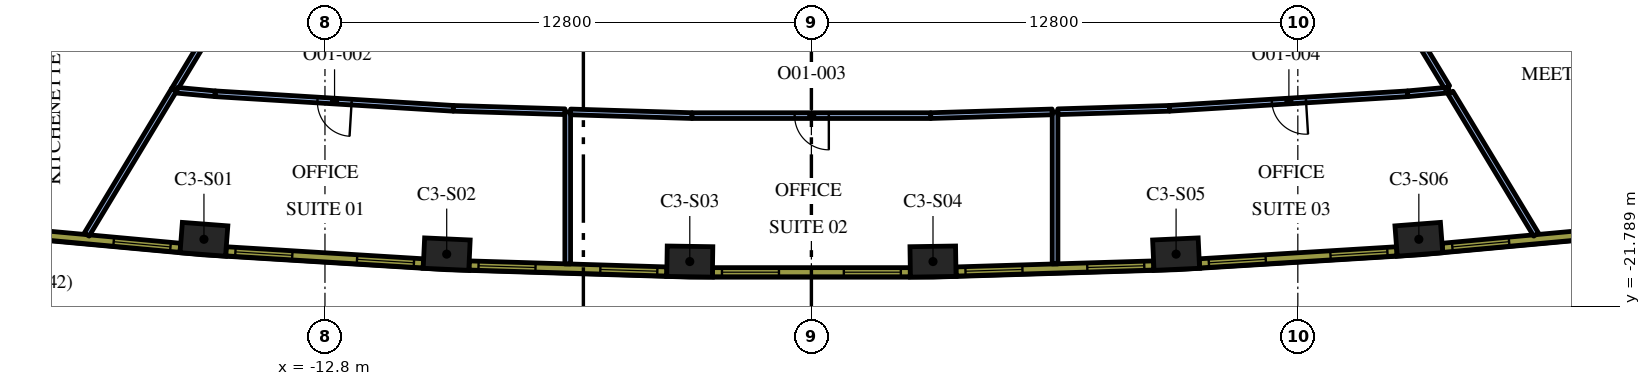
"""IFC4 building model, lengths in metres.
Left out: names, types, materials, properties, quantities, classifications, styles, units other than length and angle.
Written with IfcOpenShell. Run it as: python <this file> out.ifc"""

import sys

from ifc_helpers import new_model, si_unit, direction, frame, frame_2d, origin, origin_2d, place, context, subcontext, project, spatial, rectangle, extrude, element, fill, save


model = new_model("IFC4")
c1 = context("Model", 3, precision=1e-05, world=origin(), true_north=direction((0.0, 1.0)))
c2 = subcontext(c1, "Body", "Model", "MODEL_VIEW")
j1 = project(units=[si_unit("LENGTHUNIT", "METRE"), si_unit("PLANEANGLEUNIT", "RADIAN")], contexts=[c1])
p1 = place(None, origin())
s1 = spatial("IfcSite", under=j1, at=p1, CompositionType="ELEMENT")
p2 = place(p1, origin())
s2 = spatial("IfcBuilding", under=s1, at=p2, CompositionType="ELEMENT")
p3 = place(p2, frame((0.0, 0.0, 145.8)))
s3 = spatial("IfcBuildingStorey", under=s2, at=p3, CompositionType="ELEMENT", Elevation=145.8)
for number, where, z_axis, x_axis in (
    (1, (-15.985, -20.022, 0.0), (0.0, 0.0, 1.0), (0.997, -0.076, 0.0)),
    (2, (-9.597, -20.413, 0.0), (0.0, 0.0, 1.0), (0.999, -0.046, 0.0)),
    (3, (-3.2, -20.608, 0.0), (0.0, 0.0, 1.0), (1.0, -0.015, 0.0)),
    (4, (3.2, -20.608, 0.0), (0.0, 0.0, 1.0), (1.0, 0.015, 0.0)),
    (5, (9.597, -20.413, 0.0), (0.0, 0.0, 1.0), (0.999, 0.046, 0.0)),
    (6, (15.985, -20.022, 0.0), (0.0, 0.0, 1.0), (0.997, 0.076, 0.0)),
):
    element("IfcColumn", number, at=place(p3, frame(where, z_axis=z_axis, x_axis=x_axis)), inside=s3, PredefinedType="COLUMN", context=c2, shape_type="SweptSolid", body=[
        extrude(rectangle(XDim=1.2, YDim=0.8, at=origin_2d()), origin(), (0.0, 0.0, 1.0), 4.2),
    ])
p4 = place(p3, frame((-16.771, -16.09, 0.0), z_axis=(0.0, 0.0, 1.0), x_axis=(-0.516817512045, -0.856095590015, 0.0)))
e7 = element("IfcWall", 7, at=p4, inside=s3, PredefinedType="PARTITIONING", context=c2, shape_type="SweptSolid", body=[
    extrude(rectangle(XDim=4.45, YDim=0.15, at=frame_2d((2.225, 0.0))), origin(), (0.0, 0.0, 1.0), 3.15),
])
p5 = place(p3, frame((-16.775, -16.097, 0.0), z_axis=(0.0, 0.0, 1.0), x_axis=(0.516793803756, 0.856109902057, 0.0)))
e8 = element("IfcWall", 8, at=p5, inside=s3, PredefinedType="PARTITIONING", context=c2, shape_type="SweptSolid", body=[
    extrude(rectangle(XDim=3.856, YDim=0.15, at=frame_2d((1.928, 0.0))), origin(), (0.0, 0.0, 1.0), 3.15),
])
p6 = place(p5, frame((1.456, 0.0, 0.0)))
e9 = element("IfcOpeningElement", 9, at=p6, cuts=e8, PredefinedType="OPENING", context=c2, shape_type="SweptSolid", body=[
    extrude(rectangle(XDim=0.9, YDim=2.1, at=frame_2d((0.45, 1.05))), frame((0.0, 0.085, 0.0), z_axis=(0.0, -1.0, 0.0), x_axis=(1.0, 0.0, 0.0)), (0.0, 0.0, 1.0), 0.17),
])
p7 = place(p3, frame((-6.412, -16.668, 0.0), z_axis=(0.0, 0.0, 1.0), x_axis=(0.0, -1.0, 0.0)))
e10 = element("IfcWall", 10, at=p7, inside=s3, PredefinedType="PARTITIONING", context=c2, shape_type="SweptSolid", body=[
    extrude(rectangle(XDim=4.002, YDim=0.15, at=frame_2d((2.001, 0.0))), origin(), (0.0, 0.0, 1.0), 3.15),
])
p8 = place(p3, frame((-16.69, -16.102, 0.0), z_axis=(0.0, 0.0, 1.0), x_axis=(0.995818997537, -0.091348366946, 0.0)))
e11 = element("IfcWall", 11, at=p8, inside=s3, PredefinedType="PARTITIONING", context=c2, shape_type="SweptSolid", body=[
    extrude(rectangle(XDim=1.002, YDim=0.15, at=frame_2d((0.501, 0.0))), origin(), (0.0, 0.0, 1.0), 3.15),
])
p9 = place(p3, frame((-9.421, -16.576, 0.0), z_axis=(0.0, 0.0, 1.0), x_axis=(-0.998137075468, 0.061011298754, 0.0)))
e12 = element("IfcWall", 12, at=p9, inside=s3, PredefinedType="PARTITIONING", context=c2, shape_type="SweptSolid", body=[
    extrude(rectangle(XDim=6.282, YDim=0.15, at=frame_2d((3.141, 0.0))), origin(), (0.0, 0.0, 1.0), 3.15),
])
p10 = place(p9, frame((2.683, 0.0, 0.0)))
e13 = element("IfcOpeningElement", 13, at=p10, cuts=e12, PredefinedType="OPENING", context=c2, shape_type="SweptSolid", body=[
    extrude(rectangle(XDim=0.9, YDim=2.1, at=frame_2d((0.45, 1.05))), frame((0.0, 0.085, 0.0), z_axis=(0.0, -1.0, 0.0), x_axis=(1.0, 0.0, 0.0)), (0.0, 0.0, 1.0), 0.17),
])
p11 = place(p3, frame((-9.421, -16.576, 0.0), z_axis=(0.0, 0.0, 1.0), x_axis=(0.999533978083, -0.030525835896, 0.0)))
e14 = element("IfcWall", 14, at=p11, inside=s3, PredefinedType="PARTITIONING", context=c2, shape_type="SweptSolid", body=[
    extrude(rectangle(XDim=2.935, YDim=0.15, at=frame_2d((1.468, 0.0))), origin(), (0.0, 0.0, 1.0), 3.15),
])
p12 = place(p3, frame((6.412, -16.668, 0.0), z_axis=(0.0, 0.0, 1.0), x_axis=(0.0, -1.0, 0.0)))
e15 = element("IfcWall", 15, at=p12, inside=s3, PredefinedType="PARTITIONING", context=c2, shape_type="SweptSolid", body=[
    extrude(rectangle(XDim=4.002, YDim=0.15, at=frame_2d((2.001, 0.0))), origin(), (0.0, 0.0, 1.0), 3.15),
])
p13 = place(p3, frame((-6.337, -16.671, 0.0), z_axis=(0.0, 0.0, 1.0), x_axis=(0.999533369646, -0.030545751995, 0.0)))
e16 = element("IfcWall", 16, at=p13, inside=s3, PredefinedType="PARTITIONING", context=c2, shape_type="SweptSolid", body=[
    extrude(rectangle(XDim=3.197, YDim=0.15, at=frame_2d((1.599, 0.0))), origin(), (0.0, 0.0, 1.0), 3.15),
])
p14 = place(p3, frame((3.141, -16.768, 0.0), z_axis=(0.0, 0.0, 1.0), x_axis=(-1.0, 0.0, 0.0)))
e17 = element("IfcWall", 17, at=p14, inside=s3, PredefinedType="PARTITIONING", context=c2, shape_type="SweptSolid", body=[
    extrude(rectangle(XDim=6.283, YDim=0.15, at=frame_2d((3.141, 0.0))), origin(), (0.0, 0.0, 1.0), 3.15),
])
p15 = place(p14, frame((2.683, 0.0, 0.0)))
e18 = element("IfcOpeningElement", 18, at=p15, cuts=e17, PredefinedType="OPENING", context=c2, shape_type="SweptSolid", body=[
    extrude(rectangle(XDim=0.9, YDim=2.1, at=frame_2d((0.45, 1.05))), frame((0.0, 0.085, 0.0), z_axis=(0.0, -1.0, 0.0), x_axis=(1.0, 0.0, 0.0)), (0.0, 0.0, 1.0), 0.17),
])
p16 = place(p3, frame((3.141, -16.768, 0.0), z_axis=(0.0, 0.0, 1.0), x_axis=(0.999533369646, 0.030545751995, 0.0)))
e19 = element("IfcWall", 19, at=p16, inside=s3, PredefinedType="PARTITIONING", context=c2, shape_type="SweptSolid", body=[
    extrude(rectangle(XDim=3.197, YDim=0.15, at=frame_2d((1.599, 0.0))), origin(), (0.0, 0.0, 1.0), 3.15),
])
p17 = place(p3, frame((6.487, -16.666, 0.0), z_axis=(0.0, 0.0, 1.0), x_axis=(0.999533978083, 0.030525835896, 0.0)))
e20 = element("IfcWall", 20, at=p17, inside=s3, PredefinedType="PARTITIONING", context=c2, shape_type="SweptSolid", body=[
    extrude(rectangle(XDim=2.935, YDim=0.15, at=frame_2d((1.468, 0.0))), origin(), (0.0, 0.0, 1.0), 3.15),
])
p18 = place(p3, frame((15.692, -16.193, 0.0), z_axis=(0.0, 0.0, 1.0), x_axis=(-0.998137075468, -0.061011298754, 0.0)))
e21 = element("IfcWall", 21, at=p18, inside=s3, PredefinedType="PARTITIONING", context=c2, shape_type="SweptSolid", body=[
    extrude(rectangle(XDim=6.282, YDim=0.15, at=frame_2d((3.141, 0.0))), origin(), (0.0, 0.0, 1.0), 3.15),
])
p19 = place(p18, frame((2.683, 0.0, 0.0)))
e22 = element("IfcOpeningElement", 22, at=p19, cuts=e21, PredefinedType="OPENING", context=c2, shape_type="SweptSolid", body=[
    extrude(rectangle(XDim=0.9, YDim=2.1, at=frame_2d((0.45, 1.05))), frame((0.0, 0.085, 0.0), z_axis=(0.0, -1.0, 0.0), x_axis=(1.0, 0.0, 0.0)), (0.0, 0.0, 1.0), 0.17),
])
p20 = place(p3, frame((15.692, -16.193, 0.0), z_axis=(0.0, 0.0, 1.0), x_axis=(0.995822859979, 0.091306251389, 0.0)))
e23 = element("IfcWall", 23, at=p20, inside=s3, PredefinedType="PARTITIONING", context=c2, shape_type="SweptSolid", body=[
    extrude(rectangle(XDim=1.086, YDim=0.15, at=frame_2d((0.543, 0.0))), origin(), (0.0, 0.0, 1.0), 3.15),
])
p21 = place(p3, frame((16.816, -16.165, 0.0), z_axis=(0.0, 0.0, 1.0), x_axis=(0.516814925326, -0.85609715159, 0.0)))
e24 = element("IfcWall", 24, at=p21, inside=s3, PredefinedType="PARTITIONING", context=c2, shape_type="SweptSolid", body=[
    extrude(rectangle(XDim=4.362, YDim=0.15, at=frame_2d((2.181, 0.0))), origin(), (0.0, 0.0, 1.0), 3.15),
])
p22 = place(p3, frame((14.782, -12.796, 0.0), z_axis=(0.0, 0.0, 1.0), x_axis=(0.516809076879, -0.856100682196, 0.0)))
e25 = element("IfcWall", 25, at=p22, inside=s3, PredefinedType="PARTITIONING", context=c2, shape_type="SweptSolid", body=[
    extrude(rectangle(XDim=3.768, YDim=0.15, at=frame_2d((1.884, 0.0))), origin(), (0.0, 0.0, 1.0), 3.15),
])
p23 = place(p22, frame((1.4, 0.0, 0.0)))
e26 = element("IfcOpeningElement", 26, at=p23, cuts=e25, PredefinedType="OPENING", context=c2, shape_type="SweptSolid", body=[
    extrude(rectangle(XDim=0.9, YDim=2.1, at=frame_2d((0.45, 1.05))), frame((0.0, 0.085, 0.0), z_axis=(0.0, -1.0, 0.0), x_axis=(1.0, 0.0, 0.0)), (0.0, 0.0, 1.0), 0.17),
])
p24 = place(p3, frame((-21.797, -19.77, 0.0), z_axis=(0.0, 0.0, 1.0), x_axis=(0.995808712151, -0.091460422067, 0.0)))
e27 = element("IfcWall", 27, at=p24, inside=s3, PredefinedType="SOLIDWALL", context=c2, shape_type="SweptSolid", body=[
    extrude(rectangle(XDim=5.213, YDim=0.24, at=frame_2d((2.606, 0.0))), origin(), (0.0, 0.0, 1.0), 3.95),
])
p25 = place(p24, frame((0.221, 0.0, 0.9)))
e28 = element("IfcOpeningElement", 28, at=p25, cuts=e27, PredefinedType="OPENING", context=c2, shape_type="SweptSolid", body=[
    extrude(rectangle(XDim=1.5, YDim=2.55, at=frame_2d((0.75, 1.275))), frame((0.0, 0.13, 0.0), z_axis=(0.0, -1.0, 0.0), x_axis=(1.0, 0.0, 0.0)), (0.0, 0.0, 1.0), 0.26),
])
p26 = place(p24, frame((3.452, 0.0, 0.9)))
e29 = element("IfcOpeningElement", 29, at=p26, cuts=e27, PredefinedType="OPENING", context=c2, shape_type="SweptSolid", body=[
    extrude(rectangle(XDim=1.5, YDim=2.55, at=frame_2d((0.75, 1.275))), frame((0.0, 0.13, 0.0), z_axis=(0.0, -1.0, 0.0), x_axis=(1.0, 0.0, 0.0)), (0.0, 0.0, 1.0), 0.26),
])
p27 = place(p3, frame((-15.405, -20.338, 0.0), z_axis=(0.0, 0.0, 1.0), x_axis=(0.998135294646, -0.061040425794, 0.0)))
e30 = element("IfcWall", 30, at=p27, inside=s3, PredefinedType="SOLIDWALL", context=c2, shape_type="SweptSolid", body=[
    extrude(rectangle(XDim=5.204, YDim=0.24, at=frame_2d((2.602, 0.0))), origin(), (0.0, 0.0, 1.0), 3.95),
])
p28 = place(p27, frame((0.248, 0.0, 0.9)))
e31 = element("IfcOpeningElement", 31, at=p28, cuts=e30, PredefinedType="OPENING", context=c2, shape_type="SweptSolid", body=[
    extrude(rectangle(XDim=1.5, YDim=2.55, at=frame_2d((0.75, 1.275))), frame((0.0, 0.13, 0.0), z_axis=(0.0, -1.0, 0.0), x_axis=(1.0, 0.0, 0.0)), (0.0, 0.0, 1.0), 0.26),
])
p29 = place(p27, frame((3.455, 0.0, 0.9)))
e32 = element("IfcOpeningElement", 32, at=p29, cuts=e30, PredefinedType="OPENING", context=c2, shape_type="SweptSolid", body=[
    extrude(rectangle(XDim=1.5, YDim=2.55, at=frame_2d((0.75, 1.275))), frame((0.0, 0.13, 0.0), z_axis=(0.0, -1.0, 0.0), x_axis=(1.0, 0.0, 0.0)), (0.0, 0.0, 1.0), 0.26),
])
p30 = place(p3, frame((-9.007, -20.711, 0.0), z_axis=(0.0, 0.0, 1.0), x_axis=(0.999533441983, -0.030543384845, 0.0)))
e33 = element("IfcWall", 33, at=p30, inside=s3, PredefinedType="SOLIDWALL", context=c2, shape_type="SweptSolid", body=[
    extrude(rectangle(XDim=5.204, YDim=0.24, at=frame_2d((2.602, 0.0))), origin(), (0.0, 0.0, 1.0), 3.95),
])
p31 = place(p30, frame((0.248, 0.0, 0.9)))
e34 = element("IfcOpeningElement", 34, at=p31, cuts=e33, PredefinedType="OPENING", context=c2, shape_type="SweptSolid", body=[
    extrude(rectangle(XDim=1.5, YDim=2.55, at=frame_2d((0.75, 1.275))), frame((0.0, 0.13, 0.0), z_axis=(0.0, -1.0, 0.0), x_axis=(1.0, 0.0, 0.0)), (0.0, 0.0, 1.0), 0.26),
])
p32 = place(p30, frame((3.455, 0.0, 0.9)))
e35 = element("IfcOpeningElement", 35, at=p32, cuts=e33, PredefinedType="OPENING", context=c2, shape_type="SweptSolid", body=[
    extrude(rectangle(XDim=1.5, YDim=2.55, at=frame_2d((0.75, 1.275))), frame((0.0, 0.13, 0.0), z_axis=(0.0, -1.0, 0.0), x_axis=(1.0, 0.0, 0.0)), (0.0, 0.0, 1.0), 0.26),
])
p33 = place(p3, frame((-2.602, -20.888, 0.0), z_axis=(0.0, 0.0, 1.0), x_axis=(1.0, 0.0, 0.0)))
e36 = element("IfcWall", 36, at=p33, inside=s3, PredefinedType="SOLIDWALL", context=c2, shape_type="SweptSolid", body=[
    extrude(rectangle(XDim=5.204, YDim=0.24, at=frame_2d((2.602, 0.0))), origin(), (0.0, 0.0, 1.0), 3.95),
])
p34 = place(p33, frame((0.248, 0.0, 0.9)))
e37 = element("IfcOpeningElement", 37, at=p34, cuts=e36, PredefinedType="OPENING", context=c2, shape_type="SweptSolid", body=[
    extrude(rectangle(XDim=1.5, YDim=2.55, at=frame_2d((0.75, 1.275))), frame((0.0, 0.13, 0.0), z_axis=(0.0, -1.0, 0.0), x_axis=(1.0, 0.0, 0.0)), (0.0, 0.0, 1.0), 0.26),
])
p35 = place(p33, frame((3.455, 0.0, 0.9)))
e38 = element("IfcOpeningElement", 38, at=p35, cuts=e36, PredefinedType="OPENING", context=c2, shape_type="SweptSolid", body=[
    extrude(rectangle(XDim=1.5, YDim=2.55, at=frame_2d((0.75, 1.275))), frame((0.0, 0.13, 0.0), z_axis=(0.0, -1.0, 0.0), x_axis=(1.0, 0.0, 0.0)), (0.0, 0.0, 1.0), 0.26),
])
p36 = place(p3, frame((3.806, -20.87, 0.0), z_axis=(0.0, 0.0, 1.0), x_axis=(0.999533441983, 0.030543384845, 0.0)))
e39 = element("IfcWall", 39, at=p36, inside=s3, PredefinedType="SOLIDWALL", context=c2, shape_type="SweptSolid", body=[
    extrude(rectangle(XDim=5.204, YDim=0.24, at=frame_2d((2.602, 0.0))), origin(), (0.0, 0.0, 1.0), 3.95),
])
p37 = place(p36, frame((0.248, 0.0, 0.9)))
e40 = element("IfcOpeningElement", 40, at=p37, cuts=e39, PredefinedType="OPENING", context=c2, shape_type="SweptSolid", body=[
    extrude(rectangle(XDim=1.5, YDim=2.55, at=frame_2d((0.75, 1.275))), frame((0.0, 0.13, 0.0), z_axis=(0.0, -1.0, 0.0), x_axis=(1.0, 0.0, 0.0)), (0.0, 0.0, 1.0), 0.26),
])
p38 = place(p36, frame((3.455, 0.0, 0.9)))
e41 = element("IfcOpeningElement", 41, at=p38, cuts=e39, PredefinedType="OPENING", context=c2, shape_type="SweptSolid", body=[
    extrude(rectangle(XDim=1.5, YDim=2.55, at=frame_2d((0.75, 1.275))), frame((0.0, 0.13, 0.0), z_axis=(0.0, -1.0, 0.0), x_axis=(1.0, 0.0, 0.0)), (0.0, 0.0, 1.0), 0.26),
])
p39 = place(p3, frame((10.211, -20.656, 0.0), z_axis=(0.0, 0.0, 1.0), x_axis=(0.998135294646, 0.061040425794, 0.0)))
e42 = element("IfcWall", 42, at=p39, inside=s3, PredefinedType="SOLIDWALL", context=c2, shape_type="SweptSolid", body=[
    extrude(rectangle(XDim=5.204, YDim=0.24, at=frame_2d((2.602, 0.0))), origin(), (0.0, 0.0, 1.0), 3.95),
])
p40 = place(p39, frame((0.248, 0.0, 0.9)))
e43 = element("IfcOpeningElement", 43, at=p40, cuts=e42, PredefinedType="OPENING", context=c2, shape_type="SweptSolid", body=[
    extrude(rectangle(XDim=1.5, YDim=2.55, at=frame_2d((0.75, 1.275))), frame((0.0, 0.13, 0.0), z_axis=(0.0, -1.0, 0.0), x_axis=(1.0, 0.0, 0.0)), (0.0, 0.0, 1.0), 0.26),
])
p41 = place(p39, frame((3.455, 0.0, 0.9)))
e44 = element("IfcOpeningElement", 44, at=p41, cuts=e42, PredefinedType="OPENING", context=c2, shape_type="SweptSolid", body=[
    extrude(rectangle(XDim=1.5, YDim=2.55, at=frame_2d((0.75, 1.275))), frame((0.0, 0.13, 0.0), z_axis=(0.0, -1.0, 0.0), x_axis=(1.0, 0.0, 0.0)), (0.0, 0.0, 1.0), 0.26),
])
p42 = place(p3, frame((16.606, -20.247, 0.0), z_axis=(0.0, 0.0, 1.0), x_axis=(0.995808712151, 0.091460422067, 0.0)))
e45 = element("IfcWall", 45, at=p42, inside=s3, PredefinedType="SOLIDWALL", context=c2, shape_type="SweptSolid", body=[
    extrude(rectangle(XDim=5.213, YDim=0.24, at=frame_2d((2.606, 0.0))), origin(), (0.0, 0.0, 1.0), 3.95),
])
p43 = place(p42, frame((0.261, 0.0, 0.9)))
e46 = element("IfcOpeningElement", 46, at=p43, cuts=e45, PredefinedType="OPENING", context=c2, shape_type="SweptSolid", body=[
    extrude(rectangle(XDim=1.5, YDim=2.55, at=frame_2d((0.75, 1.275))), frame((0.0, 0.13, 0.0), z_axis=(0.0, -1.0, 0.0), x_axis=(1.0, 0.0, 0.0)), (0.0, 0.0, 1.0), 0.26),
])
p44 = place(p42, frame((3.492, 0.0, 0.9)))
e47 = element("IfcOpeningElement", 47, at=p44, cuts=e45, PredefinedType="OPENING", context=c2, shape_type="SweptSolid", body=[
    extrude(rectangle(XDim=1.5, YDim=2.55, at=frame_2d((0.75, 1.275))), frame((0.0, 0.13, 0.0), z_axis=(0.0, -1.0, 0.0), x_axis=(1.0, 0.0, 0.0)), (0.0, 0.0, 1.0), 0.26),
])
p45 = place(p10, origin())
e48 = element("IfcDoor", 48, at=p45, inside=s3, OperationType="SINGLE_SWING_LEFT", PredefinedType="DOOR", context=c2, shape_type="SweptSolid", body=[
    extrude(rectangle(XDim=0.9, YDim=2.1, at=frame_2d((0.45, 1.05))), frame((0.0, 0.025, 0.0), z_axis=(0.0, -1.0, 0.0), x_axis=(1.0, 0.0, 0.0)), (0.0, 0.0, 1.0), 0.05),
])
fill(e13, e48)
p46 = place(p15, origin())
e49 = element("IfcDoor", 49, at=p46, inside=s3, OperationType="SINGLE_SWING_LEFT", PredefinedType="DOOR", context=c2, shape_type="SweptSolid", body=[
    extrude(rectangle(XDim=0.9, YDim=2.1, at=frame_2d((0.45, 1.05))), frame((0.0, 0.025, 0.0), z_axis=(0.0, -1.0, 0.0), x_axis=(1.0, 0.0, 0.0)), (0.0, 0.0, 1.0), 0.05),
])
fill(e18, e49)
p47 = place(p19, origin())
e50 = element("IfcDoor", 50, at=p47, inside=s3, OperationType="SINGLE_SWING_LEFT", PredefinedType="DOOR", context=c2, shape_type="SweptSolid", body=[
    extrude(rectangle(XDim=0.9, YDim=2.1, at=frame_2d((0.45, 1.05))), frame((0.0, 0.025, 0.0), z_axis=(0.0, -1.0, 0.0), x_axis=(1.0, 0.0, 0.0)), (0.0, 0.0, 1.0), 0.05),
])
fill(e22, e50)
p48 = place(p26, origin())
e51 = element("IfcWindow", 51, at=p48, inside=s3, PartitioningType="SINGLE_PANEL", PredefinedType="WINDOW", context=c2, shape_type="SweptSolid", body=[
    extrude(rectangle(XDim=1.5, YDim=2.55, at=frame_2d((0.75, 1.275))), frame((0.0, 0.04, 0.0), z_axis=(0.0, -1.0, 0.0), x_axis=(1.0, 0.0, 0.0)), (0.0, 0.0, 1.0), 0.06),
])
fill(e29, e51)
p49 = place(p28, origin())
e52 = element("IfcWindow", 52, at=p49, inside=s3, PartitioningType="SINGLE_PANEL", PredefinedType="WINDOW", context=c2, shape_type="SweptSolid", body=[
    extrude(rectangle(XDim=1.5, YDim=2.55, at=frame_2d((0.75, 1.275))), frame((0.0, 0.04, 0.0), z_axis=(0.0, -1.0, 0.0), x_axis=(1.0, 0.0, 0.0)), (0.0, 0.0, 1.0), 0.06),
])
fill(e31, e52)
p50 = place(p29, origin())
e53 = element("IfcWindow", 53, at=p50, inside=s3, PartitioningType="SINGLE_PANEL", PredefinedType="WINDOW", context=c2, shape_type="SweptSolid", body=[
    extrude(rectangle(XDim=1.5, YDim=2.55, at=frame_2d((0.75, 1.275))), frame((0.0, 0.04, 0.0), z_axis=(0.0, -1.0, 0.0), x_axis=(1.0, 0.0, 0.0)), (0.0, 0.0, 1.0), 0.06),
])
fill(e32, e53)
p51 = place(p31, origin())
e54 = element("IfcWindow", 54, at=p51, inside=s3, PartitioningType="SINGLE_PANEL", PredefinedType="WINDOW", context=c2, shape_type="SweptSolid", body=[
    extrude(rectangle(XDim=1.5, YDim=2.55, at=frame_2d((0.75, 1.275))), frame((0.0, 0.04, 0.0), z_axis=(0.0, -1.0, 0.0), x_axis=(1.0, 0.0, 0.0)), (0.0, 0.0, 1.0), 0.06),
])
fill(e34, e54)
p52 = place(p32, origin())
e55 = element("IfcWindow", 55, at=p52, inside=s3, PartitioningType="SINGLE_PANEL", PredefinedType="WINDOW", context=c2, shape_type="SweptSolid", body=[
    extrude(rectangle(XDim=1.5, YDim=2.55, at=frame_2d((0.75, 1.275))), frame((0.0, 0.04, 0.0), z_axis=(0.0, -1.0, 0.0), x_axis=(1.0, 0.0, 0.0)), (0.0, 0.0, 1.0), 0.06),
])
fill(e35, e55)
p53 = place(p34, origin())
e56 = element("IfcWindow", 56, at=p53, inside=s3, PartitioningType="SINGLE_PANEL", PredefinedType="WINDOW", context=c2, shape_type="SweptSolid", body=[
    extrude(rectangle(XDim=1.5, YDim=2.55, at=frame_2d((0.75, 1.275))), frame((0.0, 0.04, 0.0), z_axis=(0.0, -1.0, 0.0), x_axis=(1.0, 0.0, 0.0)), (0.0, 0.0, 1.0), 0.06),
])
fill(e37, e56)
p54 = place(p35, origin())
e57 = element("IfcWindow", 57, at=p54, inside=s3, PartitioningType="SINGLE_PANEL", PredefinedType="WINDOW", context=c2, shape_type="SweptSolid", body=[
    extrude(rectangle(XDim=1.5, YDim=2.55, at=frame_2d((0.75, 1.275))), frame((0.0, 0.04, 0.0), z_axis=(0.0, -1.0, 0.0), x_axis=(1.0, 0.0, 0.0)), (0.0, 0.0, 1.0), 0.06),
])
fill(e38, e57)
p55 = place(p37, origin())
e58 = element("IfcWindow", 58, at=p55, inside=s3, PartitioningType="SINGLE_PANEL", PredefinedType="WINDOW", context=c2, shape_type="SweptSolid", body=[
    extrude(rectangle(XDim=1.5, YDim=2.55, at=frame_2d((0.75, 1.275))), frame((0.0, 0.04, 0.0), z_axis=(0.0, -1.0, 0.0), x_axis=(1.0, 0.0, 0.0)), (0.0, 0.0, 1.0), 0.06),
])
fill(e40, e58)
p56 = place(p38, origin())
e59 = element("IfcWindow", 59, at=p56, inside=s3, PartitioningType="SINGLE_PANEL", PredefinedType="WINDOW", context=c2, shape_type="SweptSolid", body=[
    extrude(rectangle(XDim=1.5, YDim=2.55, at=frame_2d((0.75, 1.275))), frame((0.0, 0.04, 0.0), z_axis=(0.0, -1.0, 0.0), x_axis=(1.0, 0.0, 0.0)), (0.0, 0.0, 1.0), 0.06),
])
fill(e41, e59)
p57 = place(p40, origin())
e60 = element("IfcWindow", 60, at=p57, inside=s3, PartitioningType="SINGLE_PANEL", PredefinedType="WINDOW", context=c2, shape_type="SweptSolid", body=[
    extrude(rectangle(XDim=1.5, YDim=2.55, at=frame_2d((0.75, 1.275))), frame((0.0, 0.04, 0.0), z_axis=(0.0, -1.0, 0.0), x_axis=(1.0, 0.0, 0.0)), (0.0, 0.0, 1.0), 0.06),
])
fill(e43, e60)
p58 = place(p41, origin())
e61 = element("IfcWindow", 61, at=p58, inside=s3, PartitioningType="SINGLE_PANEL", PredefinedType="WINDOW", context=c2, shape_type="SweptSolid", body=[
    extrude(rectangle(XDim=1.5, YDim=2.55, at=frame_2d((0.75, 1.275))), frame((0.0, 0.04, 0.0), z_axis=(0.0, -1.0, 0.0), x_axis=(1.0, 0.0, 0.0)), (0.0, 0.0, 1.0), 0.06),
])
fill(e44, e61)
p59 = place(p43, origin())
e62 = element("IfcWindow", 62, at=p59, inside=s3, PartitioningType="SINGLE_PANEL", PredefinedType="WINDOW", context=c2, shape_type="SweptSolid", body=[
    extrude(rectangle(XDim=1.5, YDim=2.55, at=frame_2d((0.75, 1.275))), frame((0.0, 0.04, 0.0), z_axis=(0.0, -1.0, 0.0), x_axis=(1.0, 0.0, 0.0)), (0.0, 0.0, 1.0), 0.06),
])
fill(e46, e62)
save(model, sys.argv[1])
